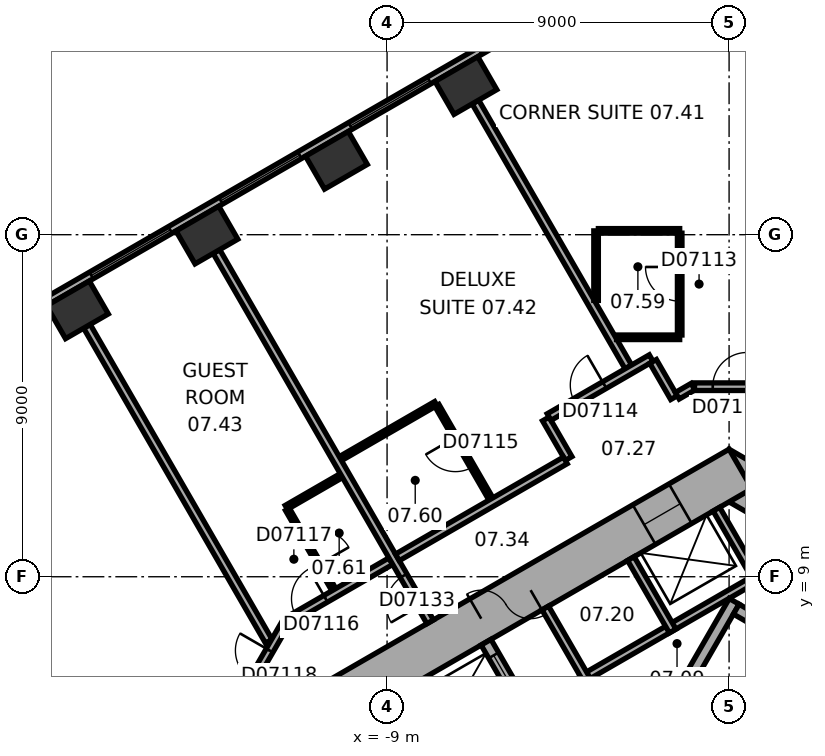
"""IFC4 building model, lengths in metres.
Left out: names, types, materials, properties, quantities, classifications, styles, units other than length and angle.
Written with IfcOpenShell. Run it as: python <this file> out.ifc"""

import sys

from ifc_helpers import new_model, si_unit, direction, frame, frame_2d, origin, origin_2d, place, context, subcontext, project, spatial, rectangle, extrude, element, fill, save


model = new_model("IFC4")
c1 = context("Model", 3, precision=1e-05, world=origin(), true_north=direction((0.0, 1.0)))
c2 = subcontext(c1, "Body", "Model", "MODEL_VIEW")
j1 = project(units=[si_unit("LENGTHUNIT", "METRE"), si_unit("PLANEANGLEUNIT", "RADIAN")], contexts=[c1])
p1 = place(None, origin())
s1 = spatial("IfcSite", under=j1, at=p1, CompositionType="ELEMENT")
p2 = place(p1, origin())
s2 = spatial("IfcBuilding", under=s1, at=p2, CompositionType="ELEMENT")
p3 = place(p2, frame((0.0, 0.0, 44.0)))
s3 = spatial("IfcBuildingStorey", under=s2, at=p3, CompositionType="ELEMENT", Elevation=44.0)
for number, where, z_axis, x_axis in (
    (1, (-6.926, 21.925, 0.0), (0.0, 0.0, 1.0), (-0.866, -0.5, 0.0)),
    (2, (-10.333, 19.957, 0.0), (0.0, 0.0, 1.0), (-0.866, -0.5, 0.0)),
    (3, (-13.74, 17.99, 0.0), (0.0, 0.0, 1.0), (-0.866, -0.5, 0.0)),
    (4, (-17.148, 16.023, 0.0), (0.0, 0.0, 1.0), (-0.866, -0.5, 0.0)),
):
    element("IfcColumn", number, at=place(p3, frame(where, z_axis=z_axis, x_axis=x_axis)), inside=s3, PredefinedType="COLUMN", context=c2, shape_type="SweptSolid", body=[
        extrude(rectangle(XDim=1.3, YDim=1.0, at=origin_2d()), origin(), (0.0, 0.0, 1.0), 3.3),
    ])
p4 = place(p3, frame((10.4, 5.658, 0.0), z_axis=(0.0, 0.0, 1.0), x_axis=(-0.866021384402, 0.500006961711, 0.0)))
e5 = element("IfcWall", 5, at=p4, inside=s3, PredefinedType="SHEAR", context=c2, shape_type="SweptSolid", body=[
    extrude(rectangle(XDim=12.355, YDim=1.2, at=frame_2d((6.178, 0.0))), origin(), (0.0, 0.0, 1.0), 3.3),
])
p5 = place(p4, frame((2.728, 0.0, 0.0)))
e6 = element("IfcOpeningElement", 6, at=p5, cuts=e5, PredefinedType="OPENING", context=c2, shape_type="SweptSolid", body=[
    extrude(rectangle(XDim=1.1, YDim=2.1, at=frame_2d((0.55, 1.05))), frame((0.0, 0.61, 0.0), z_axis=(0.0, -1.0, 0.0), x_axis=(1.0, 0.0, 0.0)), (0.0, 0.0, 1.0), 1.22),
])
p6 = place(p4, frame((5.328, 0.0, 0.0)))
e7 = element("IfcOpeningElement", 7, at=p6, cuts=e5, PredefinedType="OPENING", context=c2, shape_type="SweptSolid", body=[
    extrude(rectangle(XDim=1.1, YDim=2.1, at=frame_2d((0.55, 1.05))), frame((0.0, 0.61, 0.0), z_axis=(0.0, -1.0, 0.0), x_axis=(1.0, 0.0, 0.0)), (0.0, 0.0, 1.0), 1.22),
])
p7 = place(p4, frame((7.928, 0.0, 0.0)))
e8 = element("IfcOpeningElement", 8, at=p7, cuts=e5, PredefinedType="OPENING", context=c2, shape_type="SweptSolid", body=[
    extrude(rectangle(XDim=1.1, YDim=2.1, at=frame_2d((0.55, 1.05))), frame((0.0, 0.61, 0.0), z_axis=(0.0, -1.0, 0.0), x_axis=(1.0, 0.0, 0.0)), (0.0, 0.0, 1.0), 1.22),
])
p8 = place(p3, frame((0.3, 11.836, 0.0), z_axis=(0.0, 0.0, 1.0), x_axis=(-0.866021384402, -0.500006961711, 0.0)))
e9 = element("IfcWall", 9, at=p8, inside=s3, PredefinedType="SHEAR", context=c2, shape_type="SweptSolid", body=[
    extrude(rectangle(XDim=12.355, YDim=1.2, at=frame_2d((6.178, 0.0))), origin(), (0.0, 0.0, 1.0), 3.3),
])
p9 = place(p8, frame((6.378, 0.0, 0.0)))
e10 = element("IfcOpeningElement", 10, at=p9, cuts=e9, PredefinedType="OPENING", context=c2, shape_type="SweptSolid", body=[
    extrude(rectangle(XDim=1.5, YDim=2.1, at=frame_2d((0.75, 1.05))), frame((0.0, 0.61, 0.0), z_axis=(0.0, -1.0, 0.0), x_axis=(1.0, 0.0, 0.0)), (0.0, 0.0, 1.0), 1.22),
])
p10 = place(p8, frame((1.828, 0.0, 0.0)))
e11 = element("IfcOpeningElement", 11, at=p10, cuts=e9, PredefinedType="OPENING", context=c2, shape_type="SweptSolid", body=[
    extrude(rectangle(XDim=1.1, YDim=2.1, at=frame_2d((0.55, 1.05))), frame((0.0, 0.61, 0.0), z_axis=(0.0, -1.0, 0.0), x_axis=(1.0, 0.0, 0.0)), (0.0, 0.0, 1.0), 1.22),
])
p11 = place(p3, frame((-3.136, 24.805, 0.0), z_axis=(0.0, 0.0, 1.0), x_axis=(-0.866028291626, -0.499994998079, 0.0)))
e12 = element("IfcWall", 12, at=p11, inside=s3, PredefinedType="STANDARD", context=c2, shape_type="SweptSolid", body=[
    extrude(rectangle(XDim=21.246, YDim=0.2, at=frame_2d((10.623, 0.0))), origin(), (0.0, 0.0, 1.0), 3.3),
])
p12 = place(p11, frame((1.555, 0.0, 0.8)))
e13 = element("IfcOpeningElement", 13, at=p12, cuts=e12, PredefinedType="OPENING", context=c2, shape_type="SweptSolid", body=[
    extrude(rectangle(XDim=2.4, YDim=1.7, at=frame_2d((1.2, 0.85))), frame((0.0, 0.11, 0.0), z_axis=(0.0, -1.0, 0.0), x_axis=(1.0, 0.0, 0.0)), (0.0, 0.0, 1.0), 0.22),
])
p13 = place(p11, frame((5.489, 0.0, 0.8)))
e14 = element("IfcOpeningElement", 14, at=p13, cuts=e12, PredefinedType="OPENING", context=c2, shape_type="SweptSolid", body=[
    extrude(rectangle(XDim=2.4, YDim=1.7, at=frame_2d((1.2, 0.85))), frame((0.0, 0.11, 0.0), z_axis=(0.0, -1.0, 0.0), x_axis=(1.0, 0.0, 0.0)), (0.0, 0.0, 1.0), 0.22),
])
p14 = place(p11, frame((9.424, 0.0, 0.8)))
e15 = element("IfcOpeningElement", 15, at=p14, cuts=e12, PredefinedType="OPENING", context=c2, shape_type="SweptSolid", body=[
    extrude(rectangle(XDim=2.4, YDim=1.7, at=frame_2d((1.2, 0.85))), frame((0.0, 0.11, 0.0), z_axis=(0.0, -1.0, 0.0), x_axis=(1.0, 0.0, 0.0)), (0.0, 0.0, 1.0), 0.22),
])
p15 = place(p11, frame((13.358, 0.0, 0.8)))
e16 = element("IfcOpeningElement", 16, at=p15, cuts=e12, PredefinedType="OPENING", context=c2, shape_type="SweptSolid", body=[
    extrude(rectangle(XDim=2.4, YDim=1.7, at=frame_2d((1.2, 0.85))), frame((0.0, 0.11, 0.0), z_axis=(0.0, -1.0, 0.0), x_axis=(1.0, 0.0, 0.0)), (0.0, 0.0, 1.0), 0.22),
])
p16 = place(p11, frame((17.293, 0.0, 0.8)))
e17 = element("IfcOpeningElement", 17, at=p16, cuts=e12, PredefinedType="OPENING", context=c2, shape_type="SweptSolid", body=[
    extrude(rectangle(XDim=2.4, YDim=1.7, at=frame_2d((1.2, 0.85))), frame((0.0, 0.11, 0.0), z_axis=(0.0, -1.0, 0.0), x_axis=(1.0, 0.0, 0.0)), (0.0, 0.0, 1.0), 0.22),
])
p17 = place(p3, frame((0.803, 9.009, 0.0), z_axis=(0.0, 0.0, 1.0), x_axis=(-0.866028230842, -0.499995103361, 0.0)))
e18 = element("IfcWall", 18, at=p17, inside=s3, PredefinedType="PARTITIONING", context=c2, shape_type="SweptSolid", body=[
    extrude(rectangle(XDim=5.4, YDim=0.2, at=frame_2d((2.7, 0.0))), origin(), (0.0, 0.0, 1.0), 3.05),
])
p18 = place(p3, frame((0.767, 8.872, 0.0), z_axis=(0.0, 0.0, 1.0), x_axis=(-0.499994660107, 0.866028486751, 0.0)))
e19 = element("IfcWall", 19, at=p18, inside=s3, PredefinedType="PARTITIONING", context=c2, shape_type="SweptSolid", body=[
    extrude(rectangle(XDim=2.2, YDim=0.2, at=frame_2d((1.1, 0.0))), origin(), (0.0, 0.0, 1.0), 3.05),
])
for number, where, z_axis, x_axis in (
    (20, (-1.485, 7.572, 0.0), (0.0, 0.0, 1.0), (-0.5, 0.866, 0.0)),
    (21, (-3.737, 6.272, 0.0), (0.0, 0.0, 1.0), (-0.5, 0.866, 0.0)),
):
    element("IfcWall", number, at=place(p3, frame(where, z_axis=z_axis, x_axis=x_axis)), inside=s3, PredefinedType="PARTITIONING", context=c2, shape_type="SweptSolid", body=[
        extrude(rectangle(XDim=2.2, YDim=0.2, at=frame_2d((1.1, 0.0))), origin(), (0.0, 0.0, 1.0), 3.05),
    ])
p19 = place(p3, frame((-2.216, 4.282, 0.0), z_axis=(0.0, 0.0, 1.0), x_axis=(0.499977259774, 0.866038532462, 0.0)))
e22 = element("IfcWall", 22, at=p19, inside=s3, PredefinedType="SHEAR", context=c2, shape_type="SweptSolid", body=[
    extrude(rectangle(XDim=4.7, YDim=0.3, at=frame_2d((2.35, 0.0))), origin(), (0.0, 0.0, 1.0), 3.05),
])
p20 = place(p3, frame((6.303, 4.617, 0.0), z_axis=(0.0, 0.0, 1.0), x_axis=(-0.866027801685, 0.499995846692, 0.0)))
e23 = element("IfcWall", 23, at=p20, inside=s3, PredefinedType="SHEAR", context=c2, shape_type="SweptSolid", body=[
    extrude(rectangle(XDim=7.06, YDim=0.3, at=frame_2d((3.53, 0.0))), origin(), (0.0, 0.0, 1.0), 3.05),
])
p21 = place(p3, frame((-5.295, 5.372, 0.0), z_axis=(0.0, 0.0, 1.0), x_axis=(-0.500077893725, 0.86598042715, 0.0)))
e24 = element("IfcWall", 24, at=p21, inside=s3, PredefinedType="SHEAR", context=c2, shape_type="SweptSolid", body=[
    extrude(rectangle(XDim=2.2, YDim=0.3, at=frame_2d((1.1, 0.0))), origin(), (0.0, 0.0, 1.0), 3.05),
])
p22 = place(p21, frame((0.7, 0.0, 0.0)))
e25 = element("IfcOpeningElement", 25, at=p22, cuts=e24, PredefinedType="OPENING", context=c2, shape_type="SweptSolid", body=[
    extrude(rectangle(XDim=1.1, YDim=2.1, at=frame_2d((0.55, 1.05))), frame((0.0, 0.16, 0.0), z_axis=(0.0, -1.0, 0.0), x_axis=(1.0, 0.0, 0.0)), (0.0, 0.0, 1.0), 0.32),
])
p23 = place(p3, frame((-16.898, 15.59, 0.0), z_axis=(0.0, 0.0, 1.0), x_axis=(0.500023458698, -0.866011859475, 0.0)))
e26 = element("IfcWall", 26, at=p23, inside=s3, PredefinedType="PARTITIONING", context=c2, shape_type="SweptSolid", body=[
    extrude(rectangle(XDim=9.572, YDim=0.2, at=frame_2d((4.786, 0.0))), origin(), (0.0, 0.0, 1.0), 3.05),
])
p24 = place(p3, frame((-11.65, 7.823, 0.0), z_axis=(0.0, 0.0, 1.0), x_axis=(-0.500063520245, -0.865988727248, 0.0)))
e27 = element("IfcWall", 27, at=p24, inside=s3, PredefinedType="PARTITIONING", context=c2, shape_type="SweptSolid", body=[
    extrude(rectangle(XDim=1.9, YDim=0.2, at=frame_2d((0.95, 0.0))), origin(), (0.0, 0.0, 1.0), 3.05),
])
p25 = place(p24, frame((0.882, 0.0, 0.0)))
e28 = element("IfcOpeningElement", 28, at=p25, cuts=e27, PredefinedType="OPENING", context=c2, shape_type="SweptSolid", body=[
    extrude(rectangle(XDim=0.9, YDim=2.1, at=frame_2d((0.45, 1.05))), frame((0.0, 0.11, 0.0), z_axis=(0.0, -1.0, 0.0), x_axis=(1.0, 0.0, 0.0)), (0.0, 0.0, 1.0), 0.22),
])
p26 = place(p3, frame((-11.651, 10.825, 0.0), z_axis=(0.0, 0.0, 1.0), x_axis=(0.865998477143, 0.500046635412, 0.0)))
e29 = element("IfcWall", 29, at=p26, inside=s3, PredefinedType="PARTITIONING", context=c2, shape_type="SweptSolid", body=[
    extrude(rectangle(XDim=1.673, YDim=0.12, at=frame_2d((0.836, 0.0))), origin(), (0.0, 0.0, 1.0), 3.05),
])
p27 = place(p3, frame((-10.401, 8.66, 0.0), z_axis=(0.0, 0.0, 1.0), x_axis=(-0.500077547548, 0.865980627057, 0.0)))
e30 = element("IfcWall", 30, at=p27, inside=s3, PredefinedType="PARTITIONING", context=c2, shape_type="SweptSolid", body=[
    extrude(rectangle(XDim=2.44, YDim=0.12, at=frame_2d((1.22, 0.0))), origin(), (0.0, 0.0, 1.0), 3.05),
])
p28 = place(p27, frame((0.77, 0.0, 0.0)))
e31 = element("IfcOpeningElement", 31, at=p28, cuts=e30, PredefinedType="OPENING", context=c2, shape_type="SweptSolid", body=[
    extrude(rectangle(XDim=0.9, YDim=2.1, at=frame_2d((0.45, 1.05))), frame((0.0, 0.07, 0.0), z_axis=(0.0, -1.0, 0.0), x_axis=(1.0, 0.0, 0.0)), (0.0, 0.0, 1.0), 0.14),
])
p29 = place(p3, frame((-10.229, 12.108, 0.0), z_axis=(0.0, 0.0, 1.0), x_axis=(0.866032775405, 0.499987231761, 0.0)))
e32 = element("IfcWall", 32, at=p29, inside=s3, PredefinedType="PARTITIONING", context=c2, shape_type="SweptSolid", body=[
    extrude(rectangle(XDim=2.9, YDim=0.12, at=frame_2d((1.45, 0.0))), origin(), (0.0, 0.0, 1.0), 3.05),
])
p30 = place(p3, frame((-8.902, 9.41, 0.0), z_axis=(0.0, 0.0, 1.0), x_axis=(-0.866014299198, -0.500019233215, 0.0)))
e33 = element("IfcWall", 33, at=p30, inside=s3, PredefinedType="PARTITIONING", context=c2, shape_type="SweptSolid", body=[
    extrude(rectangle(XDim=3.133, YDim=0.2, at=frame_2d((1.567, 0.0))), origin(), (0.0, 0.0, 1.0), 3.05),
])
p31 = place(p30, frame((1.978, 0.0, 0.0)))
e34 = element("IfcOpeningElement", 34, at=p31, cuts=e33, PredefinedType="OPENING", context=c2, shape_type="SweptSolid", body=[
    extrude(rectangle(XDim=0.9, YDim=2.1, at=frame_2d((0.45, 1.05))), frame((0.0, 0.11, 0.0), z_axis=(0.0, -1.0, 0.0), x_axis=(1.0, 0.0, 0.0)), (0.0, 0.0, 1.0), 0.22),
])
p32 = place(p3, frame((-7.865, 7.814, 0.0), z_axis=(0.0, 0.0, 1.0), x_axis=(-0.500004234368, 0.866022959057, 0.0)))
e35 = element("IfcWall", 35, at=p32, inside=s3, PredefinedType="PARTITIONING", context=c2, shape_type="SweptSolid", body=[
    extrude(rectangle(XDim=11.25, YDim=0.2, at=frame_2d((5.625, 0.0))), origin(), (0.0, 0.0, 1.0), 3.05),
])
p33 = place(p32, frame((0.5, 0.0, 0.0)))
e36 = element("IfcOpeningElement", 36, at=p33, cuts=e35, PredefinedType="OPENING", context=c2, shape_type="SweptSolid", body=[
    extrude(rectangle(XDim=0.9, YDim=2.1, at=frame_2d((0.45, 1.05))), frame((0.0, 0.11, 0.0), z_axis=(0.0, -1.0, 0.0), x_axis=(1.0, 0.0, 0.0)), (0.0, 0.0, 1.0), 0.22),
])
p34 = place(p3, frame((-7.687, 13.506, 0.0), z_axis=(0.0, 0.0, 1.0), x_axis=(0.499985389037, -0.866033839264, 0.0)))
e37 = element("IfcWall", 37, at=p34, inside=s3, PredefinedType="PARTITIONING", context=c2, shape_type="SweptSolid", body=[
    extrude(rectangle(XDim=2.84, YDim=0.12, at=frame_2d((1.42, 0.0))), origin(), (0.0, 0.0, 1.0), 2.6),
])
p35 = place(p34, frame((0.97, 0.0, 0.0)))
e38 = element("IfcOpeningElement", 38, at=p35, cuts=e37, PredefinedType="OPENING", context=c2, shape_type="SweptSolid", body=[
    extrude(rectangle(XDim=0.9, YDim=2.1, at=frame_2d((0.45, 1.05))), frame((0.0, 0.07, 0.0), z_axis=(0.0, -1.0, 0.0), x_axis=(1.0, 0.0, 0.0)), (0.0, 0.0, 1.0), 0.14),
])
p36 = place(p3, frame((-6.676, 21.492, 0.0), z_axis=(0.0, 0.0, 1.0), x_axis=(0.500011263043, -0.866018900966, 0.0)))
e39 = element("IfcWall", 39, at=p36, inside=s3, PredefinedType="PARTITIONING", context=c2, shape_type="SweptSolid", body=[
    extrude(rectangle(XDim=8.049, YDim=0.2, at=frame_2d((4.024, 0.0))), origin(), (0.0, 0.0, 1.0), 3.05),
])
p37 = place(p3, frame((-4.823, 13.152, 0.0), z_axis=(0.0, 0.0, 1.0), x_axis=(0.499986357472, -0.866033280158, 0.0)))
e40 = element("IfcWall", 40, at=p37, inside=s3, PredefinedType="PARTITIONING", context=c2, shape_type="SweptSolid", body=[
    extrude(rectangle(XDim=1.201, YDim=0.2, at=frame_2d((0.601, 0.0))), origin(), (0.0, 0.0, 1.0), 3.05),
])
p38 = place(p3, frame((-4.309, 12.061, 0.0), z_axis=(0.0, 0.0, 1.0), x_axis=(-0.866020679205, -0.500008183122, 0.0)))
e41 = element("IfcWall", 41, at=p38, inside=s3, PredefinedType="PARTITIONING", context=c2, shape_type="SweptSolid", body=[
    extrude(rectangle(XDim=5.104, YDim=0.2, at=frame_2d((2.552, 0.0))), origin(), (0.0, 0.0, 1.0), 3.05),
])
p39 = place(p3, frame((-3.5, 16.271, 0.0), z_axis=(0.0, 0.0, 1.0), x_axis=(0.0, 1.0, 0.0)))
e42 = element("IfcWall", 42, at=p39, inside=s3, PredefinedType="PARTITIONING", context=c2, shape_type="SweptSolid", body=[
    extrude(rectangle(XDim=1.829, YDim=0.12, at=frame_2d((0.915, 0.0))), origin(), (0.0, 0.0, 1.0), 3.05),
])
p40 = place(p3, frame((-3.44, 18.101, 0.0), z_axis=(0.0, 0.0, 1.0), x_axis=(1.0, 0.0, 0.0)))
e43 = element("IfcWall", 43, at=p40, inside=s3, PredefinedType="PARTITIONING", context=c2, shape_type="SweptSolid", body=[
    extrude(rectangle(XDim=2.14, YDim=0.12, at=frame_2d((1.07, 0.0))), origin(), (0.0, 0.0, 1.0), 3.05),
])
p41 = place(p3, frame((-2.05, 14.752, 0.0), z_axis=(0.0, 0.0, 1.0), x_axis=(-0.866030936828, -0.499990416364, 0.0)))
e44 = element("IfcWall", 44, at=p41, inside=s3, PredefinedType="PARTITIONING", context=c2, shape_type="SweptSolid", body=[
    extrude(rectangle(XDim=3.102, YDim=0.2, at=frame_2d((1.551, 0.0))), origin(), (0.0, 0.0, 1.0), 3.05),
])
p42 = place(p41, frame((1.419, 0.0, 0.0)))
e45 = element("IfcOpeningElement", 45, at=p42, cuts=e44, PredefinedType="OPENING", context=c2, shape_type="SweptSolid", body=[
    extrude(rectangle(XDim=0.9, YDim=2.1, at=frame_2d((0.45, 1.05))), frame((0.0, 0.11, 0.0), z_axis=(0.0, -1.0, 0.0), x_axis=(1.0, 0.0, 0.0)), (0.0, 0.0, 1.0), 0.22),
])
p43 = place(p3, frame((-1.449, 13.712, 0.0), z_axis=(0.0, 0.0, 1.0), x_axis=(-0.499978356969, 0.866037899034, 0.0)))
e46 = element("IfcWall", 46, at=p43, inside=s3, PredefinedType="PARTITIONING", context=c2, shape_type="SweptSolid", body=[
    extrude(rectangle(XDim=1.101, YDim=0.2, at=frame_2d((0.551, 0.0))), origin(), (0.0, 0.0, 1.0), 3.05),
])
p44 = place(p3, frame((-1.3, 15.301, 0.0), z_axis=(0.0, 0.0, 1.0), x_axis=(-1.0, 0.0, 0.0)))
e47 = element("IfcWall", 47, at=p44, inside=s3, PredefinedType="PARTITIONING", context=c2, shape_type="SweptSolid", body=[
    extrude(rectangle(XDim=1.661, YDim=0.12, at=frame_2d((0.831, 0.0))), origin(), (0.0, 0.0, 1.0), 3.05),
])
p45 = place(p3, frame((-1.3, 18.041, 0.0), z_axis=(0.0, 0.0, 1.0), x_axis=(0.0, -1.0, 0.0)))
e48 = element("IfcWall", 48, at=p45, inside=s3, PredefinedType="PARTITIONING", context=c2, shape_type="SweptSolid", body=[
    extrude(rectangle(XDim=2.68, YDim=0.12, at=frame_2d((1.34, 0.0))), origin(), (0.0, 0.0, 1.0), 3.05),
])
p46 = place(p45, frame((0.89, 0.0, 0.0)))
e49 = element("IfcOpeningElement", 49, at=p46, cuts=e48, PredefinedType="OPENING", context=c2, shape_type="SweptSolid", body=[
    extrude(rectangle(XDim=0.9, YDim=2.1, at=frame_2d((0.45, 1.05))), frame((0.0, 0.07, 0.0), z_axis=(0.0, -1.0, 0.0), x_axis=(1.0, 0.0, 0.0)), (0.0, 0.0, 1.0), 0.14),
])
p47 = place(p3, frame((-0.95, 14.001, 0.0), z_axis=(0.0, 0.0, 1.0), x_axis=(-0.86609177584, -0.499885022602, 0.0)))
e50 = element("IfcWall", 50, at=p47, inside=s3, PredefinedType="PARTITIONING", context=c2, shape_type="SweptSolid", body=[
    extrude(rectangle(XDim=0.477, YDim=0.2, at=frame_2d((0.238, 0.0))), origin(), (0.0, 0.0, 1.0), 3.05),
])
p48 = place(p3, frame((0.95, 14.001, 0.0), z_axis=(0.0, 0.0, 1.0), x_axis=(-1.0, 0.0, 0.0)))
e51 = element("IfcWall", 51, at=p48, inside=s3, PredefinedType="PARTITIONING", context=c2, shape_type="SweptSolid", body=[
    extrude(rectangle(XDim=1.86, YDim=0.2, at=frame_2d((0.93, 0.0))), origin(), (0.0, 0.0, 1.0), 3.05),
])
p49 = place(p48, frame((0.48, 0.0, 0.0)))
e52 = element("IfcOpeningElement", 52, at=p49, cuts=e51, PredefinedType="OPENING", context=c2, shape_type="SweptSolid", body=[
    extrude(rectangle(XDim=0.9, YDim=2.1, at=frame_2d((0.45, 1.05))), frame((0.0, 0.11, 0.0), z_axis=(0.0, -1.0, 0.0), x_axis=(1.0, 0.0, 0.0)), (0.0, 0.0, 1.0), 0.22),
])
p50 = place(p13, origin())
e53 = element("IfcWindow", 53, at=p50, inside=s3, PartitioningType="SINGLE_PANEL", PredefinedType="WINDOW", context=c2, shape_type="SweptSolid", body=[
    extrude(rectangle(XDim=2.4, YDim=1.7, at=frame_2d((1.2, 0.85))), frame((0.0, 0.03, 0.0), z_axis=(0.0, -1.0, 0.0), x_axis=(1.0, 0.0, 0.0)), (0.0, 0.0, 1.0), 0.06),
])
fill(e14, e53)
p51 = place(p14, origin())
e54 = element("IfcWindow", 54, at=p51, inside=s3, PartitioningType="SINGLE_PANEL", PredefinedType="WINDOW", context=c2, shape_type="SweptSolid", body=[
    extrude(rectangle(XDim=2.4, YDim=1.7, at=frame_2d((1.2, 0.85))), frame((0.0, 0.03, 0.0), z_axis=(0.0, -1.0, 0.0), x_axis=(1.0, 0.0, 0.0)), (0.0, 0.0, 1.0), 0.06),
])
fill(e15, e54)
p52 = place(p15, origin())
e55 = element("IfcWindow", 55, at=p52, inside=s3, PartitioningType="SINGLE_PANEL", PredefinedType="WINDOW", context=c2, shape_type="SweptSolid", body=[
    extrude(rectangle(XDim=2.4, YDim=1.7, at=frame_2d((1.2, 0.85))), frame((0.0, 0.03, 0.0), z_axis=(0.0, -1.0, 0.0), x_axis=(1.0, 0.0, 0.0)), (0.0, 0.0, 1.0), 0.06),
])
fill(e16, e55)
p53 = place(p9, origin())
e56 = element("IfcDoor", 56, at=p53, inside=s3, OperationType="DOUBLE_DOOR_SINGLE_SWING", PredefinedType="DOOR", context=c2, shape_type="SweptSolid", body=[
    extrude(rectangle(XDim=1.5, YDim=2.1, at=frame_2d((0.75, 1.05))), frame((0.0, 0.025, 0.0), z_axis=(0.0, -1.0, 0.0), x_axis=(1.0, 0.0, 0.0)), (0.0, 0.0, 1.0), 0.05),
])
fill(e10, e56)
p54 = place(p22, origin())
e57 = element("IfcDoor", 57, at=p54, inside=s3, OperationType="DOUBLE_DOOR_SLIDING", PredefinedType="DOOR", context=c2, shape_type="SweptSolid", body=[
    extrude(rectangle(XDim=1.1, YDim=2.1, at=frame_2d((0.55, 1.05))), frame((0.0, 0.025, 0.0), z_axis=(0.0, -1.0, 0.0), x_axis=(1.0, 0.0, 0.0)), (0.0, 0.0, 1.0), 0.05),
])
fill(e25, e57)
p55 = place(p10, origin())
e58 = element("IfcDoor", 58, at=p55, inside=s3, OperationType="DOUBLE_DOOR_SLIDING", PredefinedType="DOOR", context=c2, shape_type="SweptSolid", body=[
    extrude(rectangle(XDim=1.1, YDim=2.1, at=frame_2d((0.55, 1.05))), frame((0.0, 0.025, 0.0), z_axis=(0.0, -1.0, 0.0), x_axis=(1.0, 0.0, 0.0)), (0.0, 0.0, 1.0), 0.05),
])
fill(e11, e58)
p56 = place(p49, origin())
e59 = element("IfcDoor", 59, at=p56, inside=s3, OperationType="SINGLE_SWING_LEFT", PredefinedType="DOOR", context=c2, shape_type="SweptSolid", body=[
    extrude(rectangle(XDim=0.9, YDim=2.1, at=frame_2d((0.45, 1.05))), frame((0.0, 0.025, 0.0), z_axis=(0.0, -1.0, 0.0), x_axis=(1.0, 0.0, 0.0)), (0.0, 0.0, 1.0), 0.05),
])
fill(e52, e59)
p57 = place(p46, origin())
e60 = element("IfcDoor", 60, at=p57, inside=s3, OperationType="SINGLE_SWING_LEFT", PredefinedType="DOOR", context=c2, shape_type="SweptSolid", body=[
    extrude(rectangle(XDim=0.9, YDim=2.1, at=frame_2d((0.45, 1.05))), frame((0.0, 0.025, 0.0), z_axis=(0.0, -1.0, 0.0), x_axis=(1.0, 0.0, 0.0)), (0.0, 0.0, 1.0), 0.05),
])
fill(e49, e60)
p58 = place(p42, origin())
e61 = element("IfcDoor", 61, at=p58, inside=s3, OperationType="SINGLE_SWING_LEFT", PredefinedType="DOOR", context=c2, shape_type="SweptSolid", body=[
    extrude(rectangle(XDim=0.9, YDim=2.1, at=frame_2d((0.45, 1.05))), frame((0.0, 0.025, 0.0), z_axis=(0.0, -1.0, 0.0), x_axis=(1.0, 0.0, 0.0)), (0.0, 0.0, 1.0), 0.05),
])
fill(e45, e61)
p59 = place(p35, origin())
e62 = element("IfcDoor", 62, at=p59, inside=s3, OperationType="SINGLE_SWING_LEFT", PredefinedType="DOOR", context=c2, shape_type="SweptSolid", body=[
    extrude(rectangle(XDim=0.9, YDim=2.1, at=frame_2d((0.45, 1.05))), frame((0.0, 0.025, 0.0), z_axis=(0.0, -1.0, 0.0), x_axis=(1.0, 0.0, 0.0)), (0.0, 0.0, 1.0), 0.05),
])
fill(e38, e62)
p60 = place(p31, origin())
e63 = element("IfcDoor", 63, at=p60, inside=s3, OperationType="SINGLE_SWING_LEFT", PredefinedType="DOOR", context=c2, shape_type="SweptSolid", body=[
    extrude(rectangle(XDim=0.9, YDim=2.1, at=frame_2d((0.45, 1.05))), frame((0.0, 0.025, 0.0), z_axis=(0.0, -1.0, 0.0), x_axis=(1.0, 0.0, 0.0)), (0.0, 0.0, 1.0), 0.05),
])
fill(e34, e63)
p61 = place(p28, origin())
e64 = element("IfcDoor", 64, at=p61, inside=s3, OperationType="SINGLE_SWING_LEFT", PredefinedType="DOOR", context=c2, shape_type="SweptSolid", body=[
    extrude(rectangle(XDim=0.9, YDim=2.1, at=frame_2d((0.45, 1.05))), frame((0.0, 0.025, 0.0), z_axis=(0.0, -1.0, 0.0), x_axis=(1.0, 0.0, 0.0)), (0.0, 0.0, 1.0), 0.05),
])
fill(e31, e64)
p62 = place(p25, origin())
e65 = element("IfcDoor", 65, at=p62, inside=s3, OperationType="SINGLE_SWING_LEFT", PredefinedType="DOOR", context=c2, shape_type="SweptSolid", body=[
    extrude(rectangle(XDim=0.9, YDim=2.1, at=frame_2d((0.45, 1.05))), frame((0.0, 0.025, 0.0), z_axis=(0.0, -1.0, 0.0), x_axis=(1.0, 0.0, 0.0)), (0.0, 0.0, 1.0), 0.05),
])
fill(e28, e65)
p63 = place(p33, origin())
e66 = element("IfcDoor", 66, at=p63, inside=s3, OperationType="SINGLE_SWING_LEFT", PredefinedType="DOOR", context=c2, shape_type="SweptSolid", body=[
    extrude(rectangle(XDim=0.9, YDim=2.1, at=frame_2d((0.45, 1.05))), frame((0.0, 0.025, 0.0), z_axis=(0.0, -1.0, 0.0), x_axis=(1.0, 0.0, 0.0)), (0.0, 0.0, 1.0), 0.05),
])
fill(e36, e66)
save(model, sys.argv[1])
